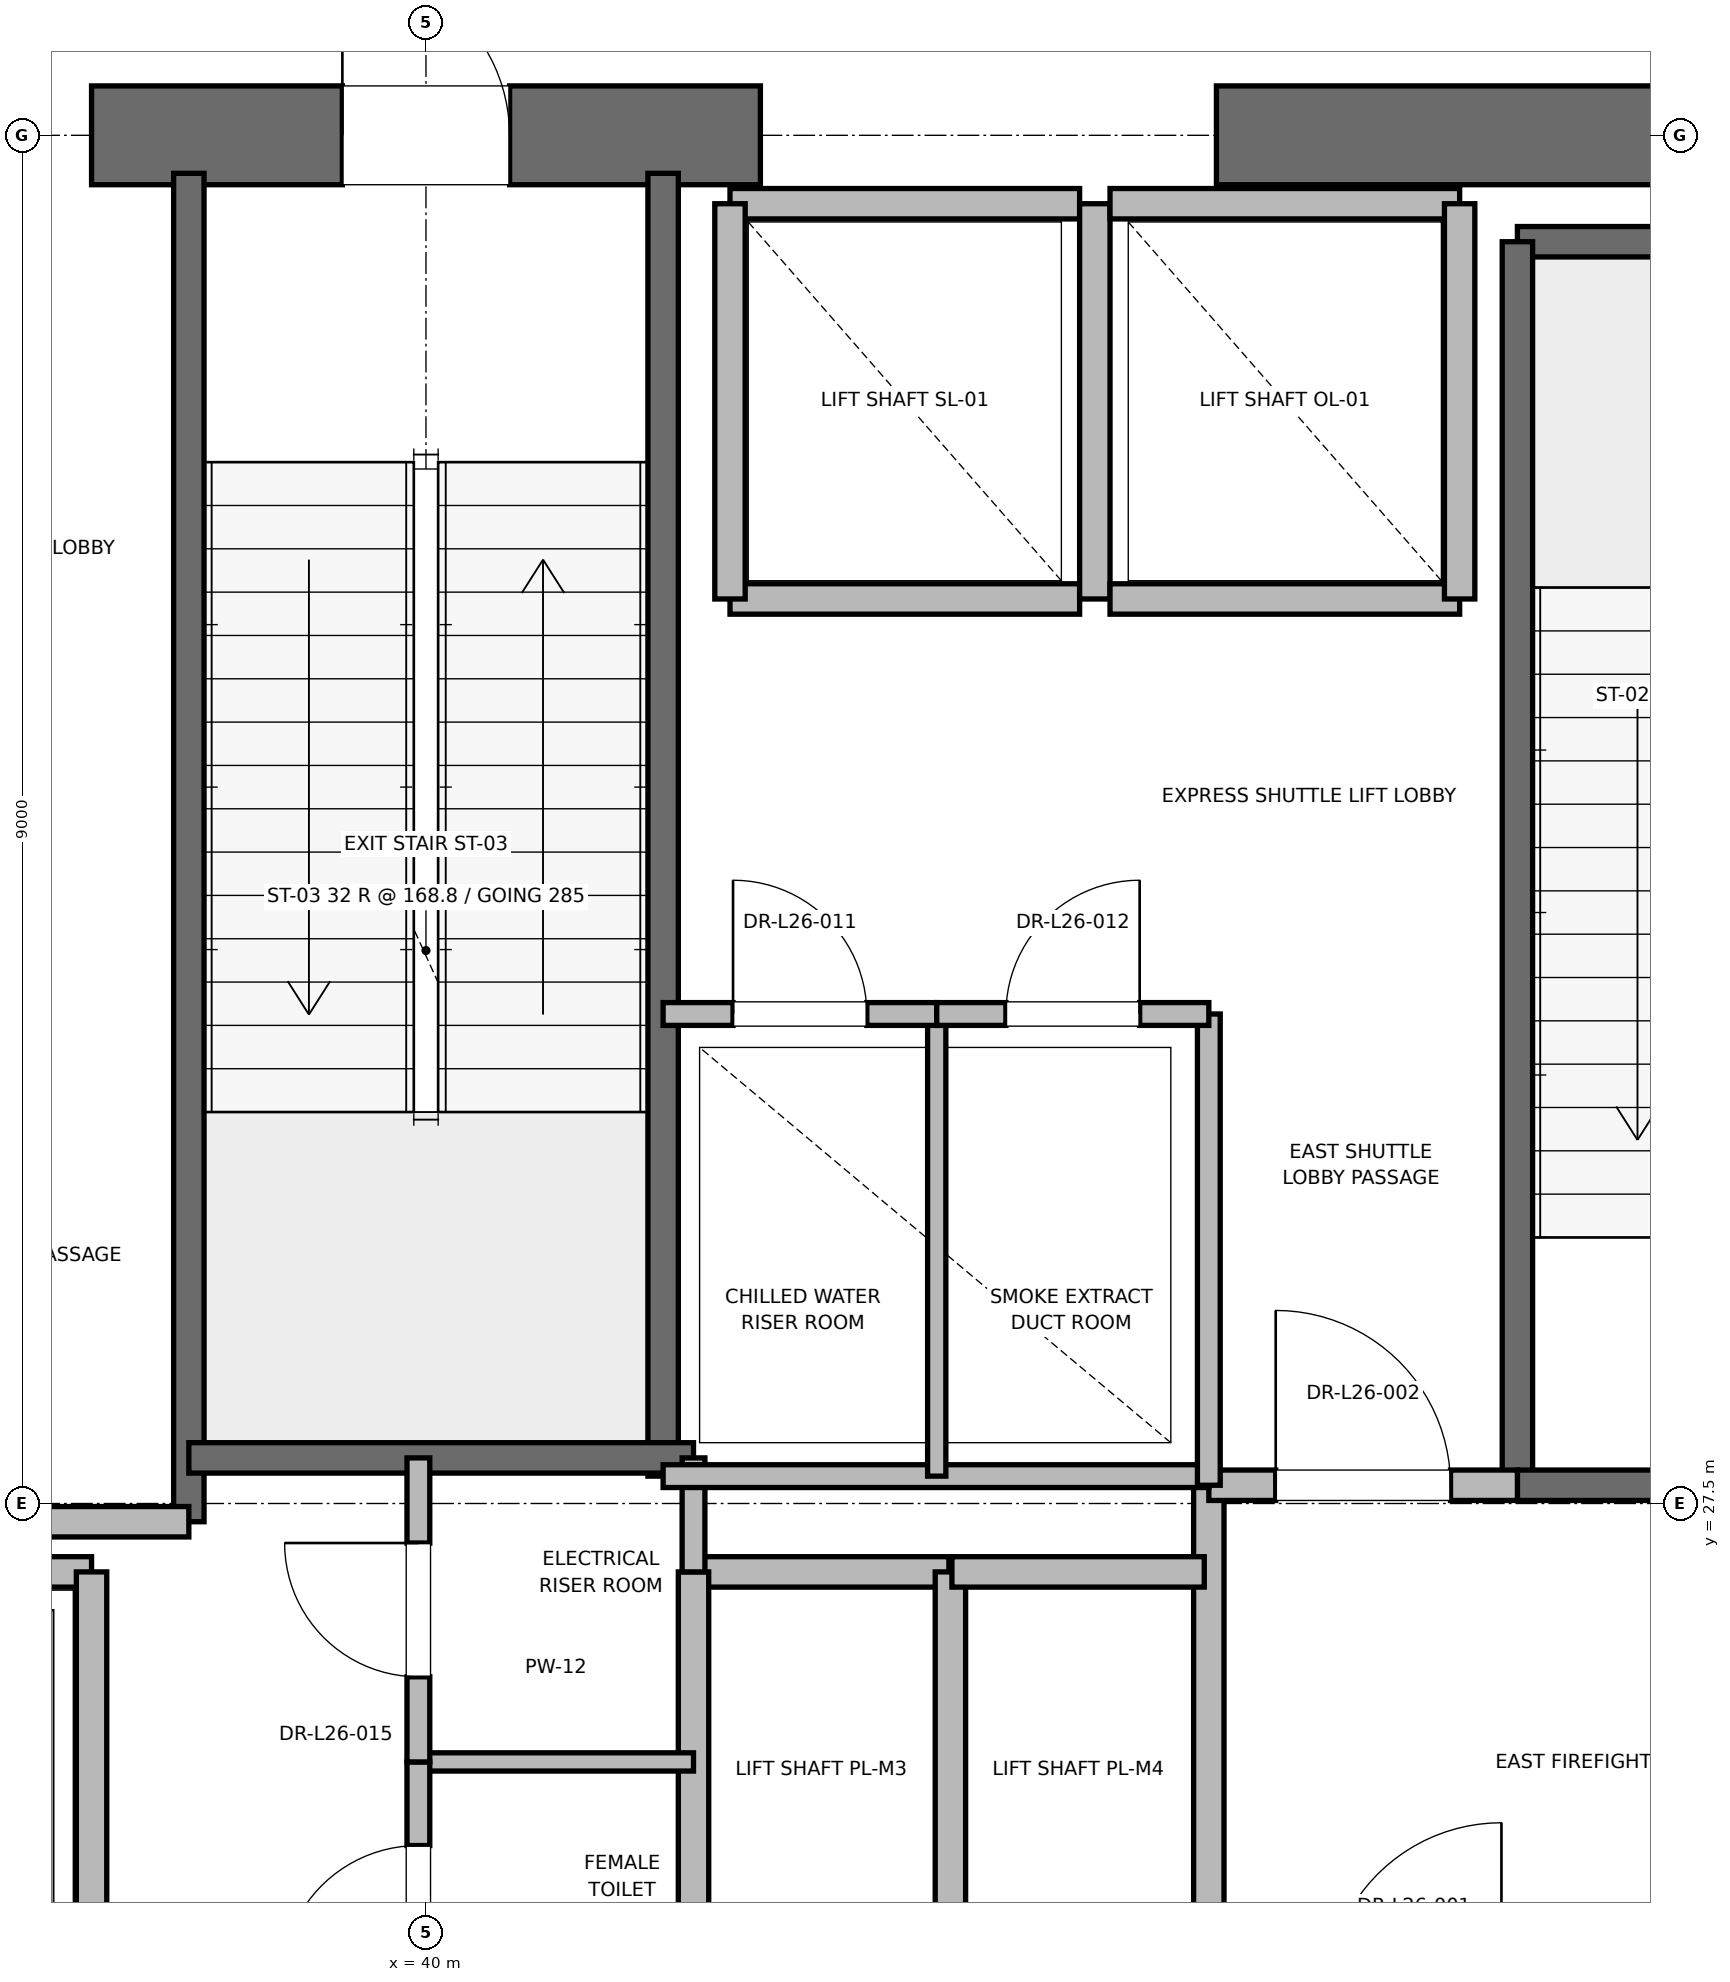
"""IFC4 building model, lengths in metres.
Left out: names, types, materials, properties, quantities, classifications, styles, units other than length and angle.
Written with IfcOpenShell. Run it as: python <this file> out.ifc"""

import sys

from ifc_helpers import new_model, si_unit, direction, frame, frame_2d, origin, place, context, subcontext, project, spatial, rectangle, extrude, element, fill, save


model = new_model("IFC4")
c1 = context("Model", 3, precision=1e-05, world=origin(), true_north=direction((0.0, 1.0)))
c2 = subcontext(c1, "Body", "Model", "MODEL_VIEW")
j1 = project(units=[si_unit("LENGTHUNIT", "METRE"), si_unit("PLANEANGLEUNIT", "RADIAN")], contexts=[c1])
p1 = place(None, origin())
s1 = spatial("IfcSite", under=j1, at=p1, CompositionType="ELEMENT")
p2 = place(p1, origin())
s2 = spatial("IfcBuilding", under=s1, at=p2, CompositionType="ELEMENT")
p3 = place(p2, frame((0.0, 0.0, 113.0)))
s3 = spatial("IfcBuildingStorey", under=s2, at=p3, CompositionType="ELEMENT", Elevation=113.0)
p4 = place(p3, frame((37.8, 36.5, 0.0), z_axis=(0.0, 0.0, 1.0), x_axis=(1.0, 0.0, 0.0)))
e1 = element("IfcWall", 1, at=p4, inside=s3, PredefinedType="SHEAR", context=c2, shape_type="SweptSolid", body=[
    extrude(rectangle(XDim=4.4, YDim=0.65, at=frame_2d((2.2, 0.0))), origin(), (0.0, 0.0, 1.0), 5.1),
])
p5 = place(p4, frame((1.65, 0.0, 0.0)))
e2 = element("IfcOpeningElement", 2, at=p5, cuts=e1, PredefinedType="OPENING", context=c2, shape_type="SweptSolid", body=[
    extrude(rectangle(XDim=1.1, YDim=2.15, at=frame_2d((0.55, 1.075))), frame((0.0, 0.325, 0.0), z_axis=(0.0, -1.0, 0.0), x_axis=(1.0, 0.0, 0.0)), (0.0, 0.0, 1.0), 0.65),
])
p6 = place(p3, frame((45.2, 36.5, 0.0), z_axis=(0.0, 0.0, 1.0), x_axis=(1.0, 0.0, 0.0)))
e3 = element("IfcWall", 3, at=p6, inside=s3, PredefinedType="SHEAR", context=c2, shape_type="SweptSolid", body=[
    extrude(rectangle(XDim=5.8, YDim=0.65, at=frame_2d((2.9, 0.0))), origin(), (0.0, 0.0, 1.0), 5.1),
])
p7 = place(p3, frame((47.18, 35.8, 0.0), z_axis=(0.0, 0.0, 1.0), x_axis=(1.0, 0.0, 0.0)))
e4 = element("IfcWall", 4, at=p7, inside=s3, PredefinedType="SOLIDWALL", context=c2, shape_type="SweptSolid", body=[
    extrude(rectangle(XDim=3.12, YDim=0.2, at=frame_2d((1.56, 0.0))), origin(), (0.0, 0.0, 1.0), 5.1),
])
p8 = place(p3, frame((47.18, 27.62, 0.0), z_axis=(0.0, 0.0, 1.0), x_axis=(0.0, 1.0, 0.0)))
e5 = element("IfcWall", 5, at=p8, inside=s3, PredefinedType="SOLIDWALL", context=c2, shape_type="SweptSolid", body=[
    extrude(rectangle(XDim=8.18, YDim=0.2, at=frame_2d((4.09, 0.0))), origin(), (0.0, 0.0, 1.0), 5.1),
])
p9 = place(p3, frame((47.18, 27.62, 0.0), z_axis=(0.0, 0.0, 1.0), x_axis=(1.0, 0.0, 0.0)))
e6 = element("IfcWall", 6, at=p9, inside=s3, PredefinedType="SOLIDWALL", context=c2, shape_type="SweptSolid", body=[
    extrude(rectangle(XDim=3.12, YDim=0.2, at=frame_2d((1.56, 0.0))), origin(), (0.0, 0.0, 1.0), 5.1),
])
p10 = place(p9, frame((1.01, 0.0, 0.0)))
e7 = element("IfcOpeningElement", 7, at=p10, cuts=e6, PredefinedType="OPENING", context=c2, shape_type="SweptSolid", body=[
    extrude(rectangle(XDim=1.1, YDim=2.15, at=frame_2d((0.55, 1.075))), frame((0.0, 0.1, 0.0), z_axis=(0.0, -1.0, 0.0), x_axis=(1.0, 0.0, 0.0)), (0.0, 0.0, 1.0), 0.2),
])
p11 = place(p3, frame((38.44, 27.38, 0.0), z_axis=(0.0, 0.0, 1.0), x_axis=(0.0, 1.0, 0.0)))
e8 = element("IfcWall", 8, at=p11, inside=s3, PredefinedType="SOLIDWALL", context=c2, shape_type="SweptSolid", body=[
    extrude(rectangle(XDim=8.87, YDim=0.2, at=frame_2d((4.435, 0.0))), origin(), (0.0, 0.0, 1.0), 5.1),
])
p12 = place(p3, frame((41.56, 27.68, 0.0), z_axis=(0.0, 0.0, 1.0), x_axis=(0.0, 1.0, 0.0)))
e9 = element("IfcWall", 9, at=p12, inside=s3, PredefinedType="SOLIDWALL", context=c2, shape_type="SweptSolid", body=[
    extrude(rectangle(XDim=8.57, YDim=0.2, at=frame_2d((4.285, 0.0))), origin(), (0.0, 0.0, 1.0), 5.1),
])
p13 = place(p3, frame((38.44, 27.8, 0.0), z_axis=(0.0, 0.0, 1.0), x_axis=(1.0, 0.0, 0.0)))
e10 = element("IfcWall", 10, at=p13, inside=s3, PredefinedType="SOLIDWALL", context=c2, shape_type="SweptSolid", body=[
    extrude(rectangle(XDim=3.32, YDim=0.2, at=frame_2d((1.66, 0.0))), origin(), (0.0, 0.0, 1.0), 5.1),
])
p14 = place(p3, frame((32.82, 27.38, 0.0), z_axis=(0.0, 0.0, 1.0), x_axis=(1.0, 0.0, 0.0)))
e11 = element("IfcWall", 11, at=p14, inside=s3, PredefinedType="PARTITIONING", context=c2, shape_type="SweptSolid", body=[
    extrude(rectangle(XDim=5.62, YDim=0.2, at=frame_2d((2.81, 0.0))), origin(), (0.0, 0.0, 1.0), 5.1),
])
p15 = place(p3, frame((45.15, 24.25, 0.0), z_axis=(0.0, 0.0, 1.0), x_axis=(0.0, 1.0, 0.0)))
e12 = element("IfcWall", 12, at=p15, inside=s3, PredefinedType="PARTITIONING", context=c2, shape_type="SweptSolid", body=[
    extrude(rectangle(XDim=3.37, YDim=0.2, at=frame_2d((1.685, 0.0))), origin(), (0.0, 0.0, 1.0), 5.1),
])
p16 = place(p3, frame((45.15, 27.62, 0.0), z_axis=(0.0, 0.0, 1.0), x_axis=(1.0, 0.0, 0.0)))
e13 = element("IfcWall", 13, at=p16, inside=s3, PredefinedType="PARTITIONING", context=c2, shape_type="SweptSolid", body=[
    extrude(rectangle(XDim=2.03, YDim=0.2, at=frame_2d((1.015, 0.0))), origin(), (0.0, 0.0, 1.0), 5.1),
])
p17 = place(p16, frame((0.44, 0.0, 0.0)))
e14 = element("IfcOpeningElement", 14, at=p17, cuts=e13, PredefinedType="OPENING", context=c2, shape_type="SweptSolid", body=[
    extrude(rectangle(XDim=1.15, YDim=2.2, at=frame_2d((0.575, 1.1))), frame((0.0, 0.1, 0.0), z_axis=(0.0, -1.0, 0.0), x_axis=(1.0, 0.0, 0.0)), (0.0, 0.0, 1.0), 0.2),
])
p18 = place(p3, frame((37.8, 27.05, 0.0), z_axis=(0.0, 0.0, 1.0), x_axis=(-1.0, 0.0, 0.0)))
e15 = element("IfcWall", 15, at=p18, inside=s3, PredefinedType="SOLIDWALL", context=c2, shape_type="SweptSolid", body=[
    extrude(rectangle(XDim=2.3, YDim=0.2, at=frame_2d((1.15, 0.0))), origin(), (0.0, 0.0, 1.0), 5.1),
])
p19 = place(p3, frame((37.8, 24.45, 0.0), z_axis=(0.0, 0.0, 1.0), x_axis=(0.0, 1.0, 0.0)))
e16 = element("IfcWall", 16, at=p19, inside=s3, PredefinedType="SOLIDWALL", context=c2, shape_type="SweptSolid", body=[
    extrude(rectangle(XDim=2.6, YDim=0.2, at=frame_2d((1.3, 0.0))), origin(), (0.0, 0.0, 1.0), 5.1),
])
p20 = place(p3, frame((43.44, 27.05, 0.0), z_axis=(0.0, 0.0, 1.0), x_axis=(-1.0, 0.0, 0.0)))
e17 = element("IfcWall", 17, at=p20, inside=s3, PredefinedType="SOLIDWALL", context=c2, shape_type="SweptSolid", body=[
    extrude(rectangle(XDim=1.68, YDim=0.2, at=frame_2d((0.84, 0.0))), origin(), (0.0, 0.0, 1.0), 5.1),
])
for number, where, z_axis, x_axis in (
    (18, (41.76, 27.05, 0.0), (0.0, 0.0, 1.0), (0.0, -1.0, 0.0)),
    (19, (43.45, 24.45, 0.0), (0.0, 0.0, 1.0), (0.0, 1.0, 0.0)),
):
    element("IfcWall", number, at=place(p3, frame(where, z_axis=z_axis, x_axis=x_axis)), inside=s3, PredefinedType="SOLIDWALL", context=c2, shape_type="SweptSolid", body=[
        extrude(rectangle(XDim=2.6, YDim=0.2, at=frame_2d((1.3, 0.0))), origin(), (0.0, 0.0, 1.0), 5.1),
    ])
p21 = place(p3, frame((45.12, 27.05, 0.0), z_axis=(0.0, 0.0, 1.0), x_axis=(-1.0, 0.0, 0.0)))
e20 = element("IfcWall", 20, at=p21, inside=s3, PredefinedType="SOLIDWALL", context=c2, shape_type="SweptSolid", body=[
    extrude(rectangle(XDim=1.66, YDim=0.2, at=frame_2d((0.83, 0.0))), origin(), (0.0, 0.0, 1.0), 5.1),
])
p22 = place(p3, frame((42.0, 33.45, 0.0), z_axis=(0.0, 0.0, 1.0), x_axis=(1.0, 0.0, 0.0)))
e21 = element("IfcWall", 21, at=p22, inside=s3, PredefinedType="SOLIDWALL", context=c2, shape_type="SweptSolid", body=[
    extrude(rectangle(XDim=2.3, YDim=0.2, at=frame_2d((1.15, 0.0))), origin(), (0.0, 0.0, 1.0), 5.1),
])
p23 = place(p3, frame((44.3, 36.05, 0.0), z_axis=(0.0, 0.0, 1.0), x_axis=(-1.0, 0.0, 0.0)))
e22 = element("IfcWall", 22, at=p23, inside=s3, PredefinedType="SOLIDWALL", context=c2, shape_type="SweptSolid", body=[
    extrude(rectangle(XDim=2.3, YDim=0.2, at=frame_2d((1.15, 0.0))), origin(), (0.0, 0.0, 1.0), 3.88),
])
for number, where, z_axis, x_axis in (
    (23, (42.0, 36.05, 0.0), (0.0, 0.0, 1.0), (0.0, -1.0, 0.0)),
    (24, (44.4, 33.45, 0.0), (0.0, 0.0, 1.0), (0.0, 1.0, 0.0)),
):
    element("IfcWall", number, at=place(p3, frame(where, z_axis=z_axis, x_axis=x_axis)), inside=s3, PredefinedType="SOLIDWALL", context=c2, shape_type="SweptSolid", body=[
        extrude(rectangle(XDim=2.6, YDim=0.2, at=frame_2d((1.3, 0.0))), origin(), (0.0, 0.0, 1.0), 3.88),
    ])
p24 = place(p3, frame((44.5, 33.45, 0.0), z_axis=(0.0, 0.0, 1.0), x_axis=(1.0, 0.0, 0.0)))
e25 = element("IfcWall", 25, at=p24, inside=s3, PredefinedType="SOLIDWALL", context=c2, shape_type="SweptSolid", body=[
    extrude(rectangle(XDim=2.3, YDim=0.2, at=frame_2d((1.15, 0.0))), origin(), (0.0, 0.0, 1.0), 5.1),
])
p25 = place(p3, frame((46.8, 36.05, 0.0), z_axis=(0.0, 0.0, 1.0), x_axis=(-1.0, 0.0, 0.0)))
e26 = element("IfcWall", 26, at=p25, inside=s3, PredefinedType="SOLIDWALL", context=c2, shape_type="SweptSolid", body=[
    extrude(rectangle(XDim=2.3, YDim=0.2, at=frame_2d((1.15, 0.0))), origin(), (0.0, 0.0, 1.0), 3.88),
])
p26 = place(p3, frame((46.8, 33.45, 0.0), z_axis=(0.0, 0.0, 1.0), x_axis=(0.0, 1.0, 0.0)))
e27 = element("IfcWall", 27, at=p26, inside=s3, PredefinedType="SOLIDWALL", context=c2, shape_type="SweptSolid", body=[
    extrude(rectangle(XDim=2.6, YDim=0.2, at=frame_2d((1.3, 0.0))), origin(), (0.0, 0.0, 1.0), 5.1),
])
p27 = place(p3, frame((39.95, 25.8, 0.0), z_axis=(0.0, 0.0, 1.0), x_axis=(1.0, 0.0, 0.0)))
e28 = element("IfcWall", 28, at=p27, inside=s3, PredefinedType="PARTITIONING", context=c2, shape_type="SweptSolid", body=[
    extrude(rectangle(XDim=1.81, YDim=0.12, at=frame_2d((0.905, 0.0))), origin(), (0.0, 0.0, 1.0), 2.85),
])
p28 = place(p3, frame((41.76, 27.05, 0.0), z_axis=(0.0, 0.0, 1.0), x_axis=(0.0, 1.0, 0.0)))
e29 = element("IfcWall", 29, at=p28, inside=s3, PredefinedType="PARTITIONING", context=c2, shape_type="SweptSolid", body=[
    extrude(rectangle(XDim=0.75, YDim=0.15, at=frame_2d((0.375, 0.0))), origin(), (0.0, 0.0, 1.0), 2.85),
])
p29 = place(p3, frame((39.95, 23.8, 0.0), z_axis=(0.0, 0.0, 1.0), x_axis=(0.0, 1.0, 0.0)))
e30 = element("IfcWall", 30, at=p29, inside=s3, PredefinedType="PARTITIONING", context=c2, shape_type="SweptSolid", body=[
    extrude(rectangle(XDim=2.0, YDim=0.15, at=frame_2d((1.0, 0.0))), origin(), (0.0, 0.0, 1.0), 2.85),
])
p30 = place(p29, frame((0.55, 0.0, 0.0)))
e31 = element("IfcOpeningElement", 31, at=p30, cuts=e30, PredefinedType="OPENING", context=c2, shape_type="SweptSolid", body=[
    extrude(rectangle(XDim=0.9, YDim=2.1, at=frame_2d((0.45, 1.05))), frame((0.0, 0.075, 0.0), z_axis=(0.0, -1.0, 0.0), x_axis=(1.0, 0.0, 0.0)), (0.0, 0.0, 1.0), 0.15),
])
p31 = place(p3, frame((39.95, 25.8, 0.0), z_axis=(0.0, 0.0, 1.0), x_axis=(0.0, 1.0, 0.0)))
e32 = element("IfcWall", 32, at=p31, inside=s3, PredefinedType="PARTITIONING", context=c2, shape_type="SweptSolid", body=[
    extrude(rectangle(XDim=2.0, YDim=0.15, at=frame_2d((1.0, 0.0))), origin(), (0.0, 0.0, 1.0), 2.85),
])
p32 = place(p31, frame((0.56, 0.0, 0.0)))
e33 = element("IfcOpeningElement", 33, at=p32, cuts=e32, PredefinedType="OPENING", context=c2, shape_type="SweptSolid", body=[
    extrude(rectangle(XDim=0.88, YDim=2.1, at=frame_2d((0.44, 1.05))), frame((0.0, 0.075, 0.0), z_axis=(0.0, -1.0, 0.0), x_axis=(1.0, 0.0, 0.0)), (0.0, 0.0, 1.0), 0.15),
])
p33 = place(p3, frame((41.56, 27.68, 0.0), z_axis=(0.0, 0.0, 1.0), x_axis=(1.0, 0.0, 0.0)))
e34 = element("IfcWall", 34, at=p33, inside=s3, PredefinedType="PARTITIONING", context=c2, shape_type="SweptSolid", body=[
    extrude(rectangle(XDim=3.59, YDim=0.15, at=frame_2d((1.795, 0.0))), origin(), (0.0, 0.0, 1.0), 2.85),
])
p34 = place(p3, frame((45.15, 27.62, 0.0), z_axis=(0.0, 0.0, 1.0), x_axis=(0.0, 1.0, 0.0)))
e35 = element("IfcWall", 35, at=p34, inside=s3, PredefinedType="PARTITIONING", context=c2, shape_type="SweptSolid", body=[
    extrude(rectangle(XDim=3.1, YDim=0.15, at=frame_2d((1.55, 0.0))), origin(), (0.0, 0.0, 1.0), 2.85),
])
p35 = place(p3, frame((43.36, 27.68, 0.0), z_axis=(0.0, 0.0, 1.0), x_axis=(0.0, 1.0, 0.0)))
e36 = element("IfcWall", 36, at=p35, inside=s3, PredefinedType="PARTITIONING", context=c2, shape_type="SweptSolid", body=[
    extrude(rectangle(XDim=3.04, YDim=0.12, at=frame_2d((1.52, 0.0))), origin(), (0.0, 0.0, 1.0), 2.85),
])
p36 = place(p3, frame((41.56, 30.72, 0.0), z_axis=(0.0, 0.0, 1.0), x_axis=(1.0, 0.0, 0.0)))
e37 = element("IfcWall", 37, at=p36, inside=s3, PredefinedType="PARTITIONING", context=c2, shape_type="SweptSolid", body=[
    extrude(rectangle(XDim=1.8, YDim=0.15, at=frame_2d((0.9, 0.0))), origin(), (0.0, 0.0, 1.0), 2.85),
])
p37 = place(p36, frame((0.46, 0.0, 0.0)))
e38 = element("IfcOpeningElement", 38, at=p37, cuts=e37, PredefinedType="OPENING", context=c2, shape_type="SweptSolid", body=[
    extrude(rectangle(XDim=0.88, YDim=2.1, at=frame_2d((0.44, 1.05))), frame((0.0, 0.075, 0.0), z_axis=(0.0, -1.0, 0.0), x_axis=(1.0, 0.0, 0.0)), (0.0, 0.0, 1.0), 0.15),
])
p38 = place(p3, frame((43.36, 30.72, 0.0), z_axis=(0.0, 0.0, 1.0), x_axis=(1.0, 0.0, 0.0)))
e39 = element("IfcWall", 39, at=p38, inside=s3, PredefinedType="PARTITIONING", context=c2, shape_type="SweptSolid", body=[
    extrude(rectangle(XDim=1.79, YDim=0.15, at=frame_2d((0.895, 0.0))), origin(), (0.0, 0.0, 1.0), 2.85),
])
p39 = place(p38, frame((0.455, 0.0, 0.0)))
e40 = element("IfcOpeningElement", 40, at=p39, cuts=e39, PredefinedType="OPENING", context=c2, shape_type="SweptSolid", body=[
    extrude(rectangle(XDim=0.88, YDim=2.1, at=frame_2d((0.44, 1.05))), frame((0.0, 0.075, 0.0), z_axis=(0.0, -1.0, 0.0), x_axis=(1.0, 0.0, 0.0)), (0.0, 0.0, 1.0), 0.15),
])
p40 = place(p5, origin())
e41 = element("IfcDoor", 41, at=p40, inside=s3, OperationType="SINGLE_SWING_LEFT", PredefinedType="DOOR", context=c2, shape_type="SweptSolid", body=[
    extrude(rectangle(XDim=1.1, YDim=2.15, at=frame_2d((0.55, 1.075))), frame((0.0, 0.025, 0.0), z_axis=(0.0, -1.0, 0.0), x_axis=(1.0, 0.0, 0.0)), (0.0, 0.0, 1.0), 0.05),
])
fill(e2, e41)
p41 = place(p17, origin())
e42 = element("IfcDoor", 42, at=p41, inside=s3, OperationType="SINGLE_SWING_LEFT", PredefinedType="DOOR", context=c2, shape_type="SweptSolid", body=[
    extrude(rectangle(XDim=1.15, YDim=2.2, at=frame_2d((0.575, 1.1))), frame((0.0, 0.025, 0.0), z_axis=(0.0, -1.0, 0.0), x_axis=(1.0, 0.0, 0.0)), (0.0, 0.0, 1.0), 0.05),
])
fill(e14, e42)
p42 = place(p30, origin())
e43 = element("IfcDoor", 43, at=p42, inside=s3, OperationType="SINGLE_SWING_LEFT", PredefinedType="DOOR", context=c2, shape_type="SweptSolid", body=[
    extrude(rectangle(XDim=0.9, YDim=2.1, at=frame_2d((0.45, 1.05))), frame((0.0, 0.025, 0.0), z_axis=(0.0, -1.0, 0.0), x_axis=(1.0, 0.0, 0.0)), (0.0, 0.0, 1.0), 0.05),
])
fill(e31, e43)
p43 = place(p32, origin())
e44 = element("IfcDoor", 44, at=p43, inside=s3, OperationType="SINGLE_SWING_RIGHT", PredefinedType="DOOR", context=c2, shape_type="SweptSolid", body=[
    extrude(rectangle(XDim=0.88, YDim=2.1, at=frame_2d((0.44, 1.05))), frame((0.0, 0.025, 0.0), z_axis=(0.0, -1.0, 0.0), x_axis=(1.0, 0.0, 0.0)), (0.0, 0.0, 1.0), 0.05),
])
fill(e33, e44)
p44 = place(p37, origin())
e45 = element("IfcDoor", 45, at=p44, inside=s3, OperationType="SINGLE_SWING_LEFT", PredefinedType="DOOR", context=c2, shape_type="SweptSolid", body=[
    extrude(rectangle(XDim=0.88, YDim=2.1, at=frame_2d((0.44, 1.05))), frame((0.0, 0.025, 0.0), z_axis=(0.0, -1.0, 0.0), x_axis=(1.0, 0.0, 0.0)), (0.0, 0.0, 1.0), 0.05),
])
fill(e38, e45)
p45 = place(p39, origin())
e46 = element("IfcDoor", 46, at=p45, inside=s3, OperationType="SINGLE_SWING_RIGHT", PredefinedType="DOOR", context=c2, shape_type="SweptSolid", body=[
    extrude(rectangle(XDim=0.88, YDim=2.1, at=frame_2d((0.44, 1.05))), frame((0.0, 0.025, 0.0), z_axis=(0.0, -1.0, 0.0), x_axis=(1.0, 0.0, 0.0)), (0.0, 0.0, 1.0), 0.05),
])
fill(e40, e46)
save(model, sys.argv[1])
